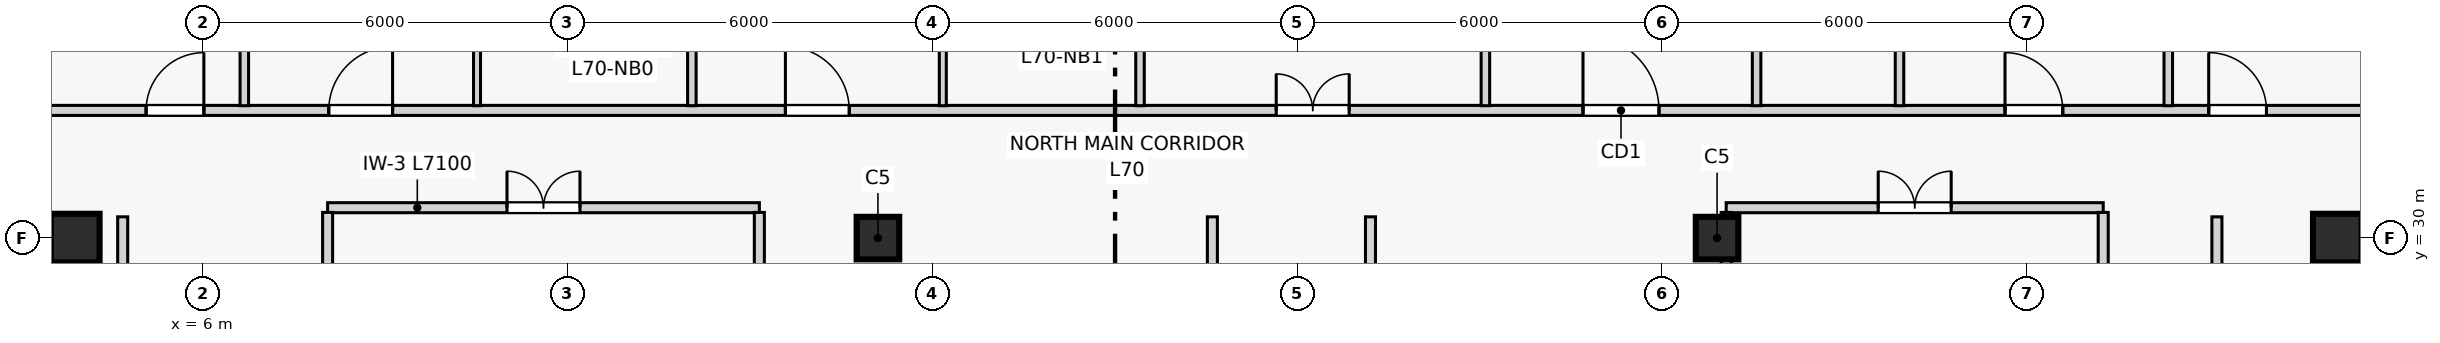
"""IFC4 building model, lengths in metres.
Left out: names, types, materials, properties, quantities, classifications, styles, units other than length and angle.
Written with IfcOpenShell. Run it as: python <this file> out.ifc"""

import sys

from ifc_helpers import new_model, si_unit, direction, frame, frame_2d, origin, origin_2d, place, context, subcontext, project, spatial, rectangle, extrude, source, transform, mapped, element, fill, save


model = new_model("IFC4")
c1 = context("Model", 3, precision=1e-05, world=origin(), true_north=direction((0.0, 1.0)))
c2 = subcontext(c1, "Body", "Model", "MODEL_VIEW")
j1 = project(units=[si_unit("LENGTHUNIT", "METRE"), si_unit("PLANEANGLEUNIT", "RADIAN")], contexts=[c1])
p1 = place(None, origin())
s1 = spatial("IfcSite", under=j1, at=p1, CompositionType="ELEMENT")
p2 = place(p1, origin())
s2 = spatial("IfcBuilding", under=s1, at=p2, CompositionType="ELEMENT")
p3 = place(p2, frame((0.0, 0.0, 267.3)))
s3 = spatial("IfcBuildingStorey", under=s2, at=p3, CompositionType="ELEMENT", Elevation=267.3)
m1 = source(origin(), c2, "Body", "SweptSolid", [
    extrude(rectangle(XDim=0.8, YDim=0.8, at=origin_2d()), origin(), (0.0, 0.0, 1.0), 3.6),
])
for number, where, z_axis, x_axis in (
    (1, (3.9, 30.0, 0.0), (0.0, 0.0, 1.0), (1.0, 0.0, 0.0)),
    (2, (41.1, 30.0, 0.0), (0.0, 0.0, 1.0), (1.0, 0.0, 0.0)),
):
    element("IfcColumn", number, at=place(p3, frame(where, z_axis=z_axis, x_axis=x_axis)), inside=s3, PredefinedType="COLUMN", context=c2, shape_type="MappedRepresentation", body=[
        mapped(m1, transform((0.0, 0.0, 0.0), scale=1.0)),
    ])
m2 = source(origin(), c2, "Body", "SweptSolid", [
    extrude(rectangle(XDim=0.7, YDim=0.7, at=origin_2d()), origin(), (0.0, 0.0, 1.0), 3.6),
])
for number, where, z_axis, x_axis in (
    (3, (17.1, 30.0, 0.0), (0.0, 0.0, 1.0), (1.0, 0.0, 0.0)),
    (4, (30.9, 30.0, 0.0), (0.0, 0.0, 1.0), (1.0, 0.0, 0.0)),
):
    element("IfcColumn", number, at=place(p3, frame(where, z_axis=z_axis, x_axis=x_axis)), inside=s3, PredefinedType="COLUMN", context=c2, shape_type="MappedRepresentation", body=[
        mapped(m2, transform((0.0, 0.0, 0.0), scale=1.0)),
    ])
p4 = place(p3, frame((8.05, 30.5, 0.0), z_axis=(0.0, 0.0, 1.0), x_axis=(1.0, 0.0, 0.0)))
e5 = element("IfcWall", 5, at=p4, inside=s3, PredefinedType="PARTITIONING", context=c2, shape_type="SweptSolid", body=[
    extrude(rectangle(XDim=7.1, YDim=0.165, at=frame_2d((3.55, 0.0))), origin(), (0.0, 0.0, 1.0), 3.32),
])
p5 = place(p4, frame((2.95, 0.0, 0.0)))
e6 = element("IfcOpeningElement", 6, at=p5, cuts=e5, PredefinedType="OPENING", context=c2, shape_type="SweptSolid", body=[
    extrude(rectangle(XDim=1.2, YDim=2.2, at=frame_2d((0.6, 1.1))), frame((0.0, 0.093, 0.0), z_axis=(0.0, -1.0, 0.0), x_axis=(1.0, 0.0, 0.0)), (0.0, 0.0, 1.0), 0.185),
])
for number, where, z_axis, x_axis in (
    (7, (8.05, 27.27, 0.0), (0.0, 0.0, 1.0), (0.0, 1.0, 0.0)),
    (8, (15.15, 27.27, 0.0), (0.0, 0.0, 1.0), (0.0, 1.0, 0.0)),
):
    element("IfcWall", number, at=place(p3, frame(where, z_axis=z_axis, x_axis=x_axis)), inside=s3, PredefinedType="PARTITIONING", context=c2, shape_type="SweptSolid", body=[
        extrude(rectangle(XDim=3.153, YDim=0.165, at=frame_2d((1.576, 0.0))), origin(), (0.0, 0.0, 1.0), 3.32),
    ])
p6 = place(p3, frame((31.05, 30.5, 0.0), z_axis=(0.0, 0.0, 1.0), x_axis=(1.0, 0.0, 0.0)))
e9 = element("IfcWall", 9, at=p6, inside=s3, PredefinedType="PARTITIONING", context=c2, shape_type="SweptSolid", body=[
    extrude(rectangle(XDim=6.2, YDim=0.165, at=frame_2d((3.1, 0.0))), origin(), (0.0, 0.0, 1.0), 3.32),
])
p7 = place(p6, frame((2.5, 0.0, 0.0)))
e10 = element("IfcOpeningElement", 10, at=p7, cuts=e9, PredefinedType="OPENING", context=c2, shape_type="SweptSolid", body=[
    extrude(rectangle(XDim=1.2, YDim=2.2, at=frame_2d((0.6, 1.1))), frame((0.0, 0.093, 0.0), z_axis=(0.0, -1.0, 0.0), x_axis=(1.0, 0.0, 0.0)), (0.0, 0.0, 1.0), 0.185),
])
for number, where, z_axis, x_axis in (
    (11, (31.05, 27.27, 0.0), (0.0, 0.0, 1.0), (0.0, 1.0, 0.0)),
    (12, (37.25, 27.27, 0.0), (0.0, 0.0, 1.0), (0.0, 1.0, 0.0)),
):
    element("IfcWall", number, at=place(p3, frame(where, z_axis=z_axis, x_axis=x_axis)), inside=s3, PredefinedType="PARTITIONING", context=c2, shape_type="SweptSolid", body=[
        extrude(rectangle(XDim=3.153, YDim=0.165, at=frame_2d((1.576, 0.0))), origin(), (0.0, 0.0, 1.0), 3.32),
    ])
p8 = place(p3, frame((3.145, 32.1, 0.0), z_axis=(0.0, 0.0, 1.0), x_axis=(1.0, 0.0, 0.0)))
e13 = element("IfcWall", 13, at=p8, inside=s3, PredefinedType="PARTITIONING", context=c2, shape_type="SweptSolid", body=[
    extrude(rectangle(XDim=38.71, YDim=0.165, at=frame_2d((19.355, 0.0))), origin(), (0.0, 0.0, 1.0), 3.32),
])
p9 = place(p8, frame((4.924, 0.0, 0.0)))
e14 = element("IfcOpeningElement", 14, at=p9, cuts=e13, PredefinedType="OPENING", context=c2, shape_type="SweptSolid", body=[
    extrude(rectangle(XDim=1.05, YDim=2.15, at=frame_2d((0.525, 1.075))), frame((0.0, 0.093, 0.0), z_axis=(0.0, -1.0, 0.0), x_axis=(1.0, 0.0, 0.0)), (0.0, 0.0, 1.0), 0.185),
])
p10 = place(p8, frame((12.434, 0.0, 0.0)))
e15 = element("IfcOpeningElement", 15, at=p10, cuts=e13, PredefinedType="OPENING", context=c2, shape_type="SweptSolid", body=[
    extrude(rectangle(XDim=1.05, YDim=2.15, at=frame_2d((0.525, 1.075))), frame((0.0, 0.093, 0.0), z_axis=(0.0, -1.0, 0.0), x_axis=(1.0, 0.0, 0.0)), (0.0, 0.0, 1.0), 0.185),
])
p11 = place(p8, frame((20.505, 0.0, 0.0)))
e16 = element("IfcOpeningElement", 16, at=p11, cuts=e13, PredefinedType="OPENING", context=c2, shape_type="SweptSolid", body=[
    extrude(rectangle(XDim=1.2, YDim=2.2, at=frame_2d((0.6, 1.1))), frame((0.0, 0.093, 0.0), z_axis=(0.0, -1.0, 0.0), x_axis=(1.0, 0.0, 0.0)), (0.0, 0.0, 1.0), 0.185),
])
p12 = place(p8, frame((25.55, 0.0, 0.0)))
e17 = element("IfcOpeningElement", 17, at=p12, cuts=e13, PredefinedType="OPENING", context=c2, shape_type="SweptSolid", body=[
    extrude(rectangle(XDim=1.25, YDim=2.2, at=frame_2d((0.625, 1.1))), frame((0.0, 0.093, 0.0), z_axis=(0.0, -1.0, 0.0), x_axis=(1.0, 0.0, 0.0)), (0.0, 0.0, 1.0), 0.185),
])
p13 = place(p8, frame((32.49, 0.0, 0.0)))
e18 = element("IfcOpeningElement", 18, at=p13, cuts=e13, PredefinedType="OPENING", context=c2, shape_type="SweptSolid", body=[
    extrude(rectangle(XDim=0.95, YDim=2.1, at=frame_2d((0.475, 1.05))), frame((0.0, 0.093, 0.0), z_axis=(0.0, -1.0, 0.0), x_axis=(1.0, 0.0, 0.0)), (0.0, 0.0, 1.0), 0.185),
])
p14 = place(p8, frame((1.92, 0.0, 0.0)))
e19 = element("IfcOpeningElement", 19, at=p14, cuts=e13, PredefinedType="OPENING", context=c2, shape_type="SweptSolid", body=[
    extrude(rectangle(XDim=0.95, YDim=2.1, at=frame_2d((0.475, 1.05))), frame((0.0, 0.093, 0.0), z_axis=(0.0, -1.0, 0.0), x_axis=(1.0, 0.0, 0.0)), (0.0, 0.0, 1.0), 0.185),
])
p15 = place(p8, frame((35.84, 0.0, 0.0)))
e20 = element("IfcOpeningElement", 20, at=p15, cuts=e13, PredefinedType="OPENING", context=c2, shape_type="SweptSolid", body=[
    extrude(rectangle(XDim=0.95, YDim=2.1, at=frame_2d((0.475, 1.05))), frame((0.0, 0.093, 0.0), z_axis=(0.0, -1.0, 0.0), x_axis=(1.0, 0.0, 0.0)), (0.0, 0.0, 1.0), 0.185),
])
p16 = place(p3, frame((22.6, 11.45, 0.0), z_axis=(0.0, 0.0, 1.0), x_axis=(0.0, 1.0, 0.0)))
e21 = element("IfcWall", 21, at=p16, inside=s3, PredefinedType="PARTITIONING", context=c2, shape_type="SweptSolid", body=[
    extrude(rectangle(XDim=18.9, YDim=0.165, at=frame_2d((9.45, 0.0))), origin(), (0.0, 0.0, 1.0), 3.32),
])
p17 = place(p16, frame((8.825, 0.0, 0.0)))
e22 = element("IfcOpeningElement", 22, at=p17, cuts=e21, PredefinedType="OPENING", context=c2, shape_type="SweptSolid", body=[
    extrude(rectangle(XDim=1.25, YDim=2.2, at=frame_2d((0.625, 1.1))), frame((0.0, 0.093, 0.0), z_axis=(0.0, -1.0, 0.0), x_axis=(1.0, 0.0, 0.0)), (0.0, 0.0, 1.0), 0.185),
])
p18 = place(p3, frame((25.2, 11.45, 0.0), z_axis=(0.0, 0.0, 1.0), x_axis=(0.0, 1.0, 0.0)))
e23 = element("IfcWall", 23, at=p18, inside=s3, PredefinedType="PARTITIONING", context=c2, shape_type="SweptSolid", body=[
    extrude(rectangle(XDim=18.9, YDim=0.165, at=frame_2d((9.45, 0.0))), origin(), (0.0, 0.0, 1.0), 3.32),
])
p19 = place(p18, frame((8.825, 0.0, 0.0)))
e24 = element("IfcOpeningElement", 24, at=p19, cuts=e23, PredefinedType="OPENING", context=c2, shape_type="SweptSolid", body=[
    extrude(rectangle(XDim=1.25, YDim=2.2, at=frame_2d((0.625, 1.1))), frame((0.0, 0.093, 0.0), z_axis=(0.0, -1.0, 0.0), x_axis=(1.0, 0.0, 0.0)), (0.0, 0.0, 1.0), 0.185),
])
p20 = place(p3, frame((4.68, 26.45, 0.0), z_axis=(0.0, 0.0, 1.0), x_axis=(0.0, 1.0, 0.0)))
e25 = element("IfcWall", 25, at=p20, inside=s3, PredefinedType="PARTITIONING", context=c2, shape_type="SweptSolid", body=[
    extrude(rectangle(XDim=3.9, YDim=0.165, at=frame_2d((1.95, 0.0))), origin(), (0.0, 0.0, 1.0), 3.32),
])
p21 = place(p20, frame((1.475, 0.0, 0.0)))
e26 = element("IfcOpeningElement", 26, at=p21, cuts=e25, PredefinedType="OPENING", context=c2, shape_type="SweptSolid", body=[
    extrude(rectangle(XDim=0.95, YDim=2.1, at=frame_2d((0.475, 1.05))), frame((0.0, 0.093, 0.0), z_axis=(0.0, -1.0, 0.0), x_axis=(1.0, 0.0, 0.0)), (0.0, 0.0, 1.0), 0.185),
])
p22 = place(p3, frame((39.12, 11.4, 0.0), z_axis=(0.0, 0.0, 1.0), x_axis=(0.0, 1.0, 0.0)))
e27 = element("IfcWall", 27, at=p22, inside=s3, PredefinedType="PARTITIONING", context=c2, shape_type="SweptSolid", body=[
    extrude(rectangle(XDim=18.95, YDim=0.165, at=frame_2d((9.475, 0.0))), origin(), (0.0, 0.0, 1.0), 3.32),
])
p23 = place(p22, frame((2.075, 0.0, 0.0)))
e28 = element("IfcOpeningElement", 28, at=p23, cuts=e27, PredefinedType="OPENING", context=c2, shape_type="SweptSolid", body=[
    extrude(rectangle(XDim=0.95, YDim=2.1, at=frame_2d((0.475, 1.05))), frame((0.0, 0.093, 0.0), z_axis=(0.0, -1.0, 0.0), x_axis=(1.0, 0.0, 0.0)), (0.0, 0.0, 1.0), 0.185),
])
p24 = place(p3, frame((6.68, 32.177, 0.0), z_axis=(0.0, 0.0, 1.0), x_axis=(0.0, 1.0, 0.0)))
e29 = element("IfcWall", 29, at=p24, inside=s3, PredefinedType="PARTITIONING", context=c2, shape_type="SweptSolid", body=[
    extrude(rectangle(XDim=7.877, YDim=0.14, at=frame_2d((3.939, 0.0))), origin(), (0.0, 0.0, 1.0), 3.32),
])
for number, where, z_axis, x_axis in (
    (30, (14.04, 32.177, 0.0), (0.0, 0.0, 1.0), (0.0, 1.0, 0.0)),
    (31, (21.41, 32.177, 0.0), (0.0, 0.0, 1.0), (0.0, 1.0, 0.0)),
    (32, (27.09, 32.177, 0.0), (0.0, 0.0, 1.0), (0.0, 1.0, 0.0)),
    (33, (33.9, 32.177, 0.0), (0.0, 0.0, 1.0), (0.0, 1.0, 0.0)),
):
    element("IfcWall", number, at=place(p3, frame(where, z_axis=z_axis, x_axis=x_axis)), inside=s3, PredefinedType="PARTITIONING", context=c2, shape_type="SweptSolid", body=[
        extrude(rectangle(XDim=9.677, YDim=0.14, at=frame_2d((4.839, 0.0))), origin(), (0.0, 0.0, 1.0), 3.32),
    ])
p25 = place(p3, frame((38.32, 32.177, 0.0), z_axis=(0.0, 0.0, 1.0), x_axis=(0.0, 1.0, 0.0)))
e34 = element("IfcWall", 34, at=p25, inside=s3, PredefinedType="PARTITIONING", context=c2, shape_type="SweptSolid", body=[
    extrude(rectangle(XDim=7.877, YDim=0.14, at=frame_2d((3.939, 0.0))), origin(), (0.0, 0.0, 1.0), 3.32),
])
p26 = place(p3, frame((10.507, 32.177, 0.0), z_axis=(0.0, 0.0, 1.0), x_axis=(0.0, 1.0, 0.0)))
e35 = element("IfcWall", 35, at=p26, inside=s3, PredefinedType="PARTITIONING", context=c2, shape_type="SweptSolid", body=[
    extrude(rectangle(XDim=9.677, YDim=0.115, at=frame_2d((4.839, 0.0))), origin(), (0.0, 0.0, 1.0), 3.32),
])
p27 = place(p26, frame((6.895, 0.0, 0.0)))
e36 = element("IfcOpeningElement", 36, at=p27, cuts=e35, PredefinedType="OPENING", context=c2, shape_type="SweptSolid", body=[
    extrude(rectangle(XDim=0.95, YDim=2.1, at=frame_2d((0.475, 1.05))), frame((0.0, 0.067, 0.0), z_axis=(0.0, -1.0, 0.0), x_axis=(1.0, 0.0, 0.0)), (0.0, 0.0, 1.0), 0.135),
])
p28 = place(p26, frame((3.631, 0.0, 0.0)))
e37 = element("IfcOpeningElement", 37, at=p28, cuts=e35, PredefinedType="OPENING", context=c2, shape_type="SweptSolid", body=[
    extrude(rectangle(XDim=0.9, YDim=2.1, at=frame_2d((0.45, 1.05))), frame((0.0, 0.067, 0.0), z_axis=(0.0, -1.0, 0.0), x_axis=(1.0, 0.0, 0.0)), (0.0, 0.0, 1.0), 0.135),
])
p29 = place(p26, frame((0.973, 0.0, 0.0)))
e38 = element("IfcOpeningElement", 38, at=p29, cuts=e35, PredefinedType="OPENING", context=c2, shape_type="SweptSolid", body=[
    extrude(rectangle(XDim=0.9, YDim=2.1, at=frame_2d((0.45, 1.05))), frame((0.0, 0.067, 0.0), z_axis=(0.0, -1.0, 0.0), x_axis=(1.0, 0.0, 0.0)), (0.0, 0.0, 1.0), 0.135),
])
p30 = place(p3, frame((18.167, 32.177, 0.0), z_axis=(0.0, 0.0, 1.0), x_axis=(0.0, 1.0, 0.0)))
e39 = element("IfcWall", 39, at=p30, inside=s3, PredefinedType="PARTITIONING", context=c2, shape_type="SweptSolid", body=[
    extrude(rectangle(XDim=9.677, YDim=0.115, at=frame_2d((4.839, 0.0))), origin(), (0.0, 0.0, 1.0), 3.32),
])
p31 = place(p30, frame((6.623, 0.0, 0.0)))
e40 = element("IfcOpeningElement", 40, at=p31, cuts=e39, PredefinedType="OPENING", context=c2, shape_type="SweptSolid", body=[
    extrude(rectangle(XDim=0.9, YDim=2.1, at=frame_2d((0.45, 1.05))), frame((0.0, 0.067, 0.0), z_axis=(0.0, -1.0, 0.0), x_axis=(1.0, 0.0, 0.0)), (0.0, 0.0, 1.0), 0.135),
])
p32 = place(p30, frame((2.062, 0.0, 0.0)))
e41 = element("IfcOpeningElement", 41, at=p32, cuts=e39, PredefinedType="OPENING", context=c2, shape_type="SweptSolid", body=[
    extrude(rectangle(XDim=0.9, YDim=2.1, at=frame_2d((0.45, 1.05))), frame((0.0, 0.067, 0.0), z_axis=(0.0, -1.0, 0.0), x_axis=(1.0, 0.0, 0.0)), (0.0, 0.0, 1.0), 0.135),
])
p33 = place(p3, frame((31.55, 32.177, 0.0), z_axis=(0.0, 0.0, 1.0), x_axis=(0.0, 1.0, 0.0)))
e42 = element("IfcWall", 42, at=p33, inside=s3, PredefinedType="PLUMBINGWALL", context=c2, shape_type="SweptSolid", body=[
    extrude(rectangle(XDim=9.677, YDim=0.14, at=frame_2d((4.839, 0.0))), origin(), (0.0, 0.0, 1.0), 3.32),
])
p34 = place(p33, frame((0.962, 0.0, 0.0)))
e43 = element("IfcOpeningElement", 43, at=p34, cuts=e42, PredefinedType="OPENING", context=c2, shape_type="SweptSolid", body=[
    extrude(rectangle(XDim=0.9, YDim=2.1, at=frame_2d((0.45, 1.05))), frame((0.0, 0.08, 0.0), z_axis=(0.0, -1.0, 0.0), x_axis=(1.0, 0.0, 0.0)), (0.0, 0.0, 1.0), 0.16),
])
p35 = place(p33, frame((5.522, 0.0, 0.0)))
e44 = element("IfcOpeningElement", 44, at=p35, cuts=e42, PredefinedType="OPENING", context=c2, shape_type="SweptSolid", body=[
    extrude(rectangle(XDim=0.9, YDim=2.1, at=frame_2d((0.45, 1.05))), frame((0.0, 0.08, 0.0), z_axis=(0.0, -1.0, 0.0), x_axis=(1.0, 0.0, 0.0)), (0.0, 0.0, 1.0), 0.16),
])
m3 = source(origin(), c2, "Body", "SweptSolid", [
    extrude(rectangle(XDim=1.2, YDim=2.2, at=frame_2d((0.6, 1.1))), frame((0.0, 0.025, 0.0), z_axis=(0.0, -1.0, 0.0), x_axis=(1.0, 0.0, 0.0)), (0.0, 0.0, 1.0), 0.05),
])
p36 = place(p5, origin())
e45 = element("IfcDoor", 45, at=p36, inside=s3, OperationType="DOUBLE_DOOR_SINGLE_SWING", PredefinedType="DOOR", context=c2, shape_type="MappedRepresentation", body=[
    mapped(m3, transform((0.0, 0.0, 0.0), scale=1.0)),
])
fill(e6, e45)
p37 = place(p7, origin())
e46 = element("IfcDoor", 46, at=p37, inside=s3, OperationType="DOUBLE_DOOR_SINGLE_SWING", PredefinedType="DOOR", context=c2, shape_type="MappedRepresentation", body=[
    mapped(m3, transform((0.0, 0.0, 0.0), scale=1.0)),
])
fill(e10, e46)
m4 = source(origin(), c2, "Body", "SweptSolid", [
    extrude(rectangle(XDim=1.05, YDim=2.15, at=frame_2d((0.525, 1.075))), frame((0.0, 0.025, 0.0), z_axis=(0.0, -1.0, 0.0), x_axis=(1.0, 0.0, 0.0)), (0.0, 0.0, 1.0), 0.05),
])
p38 = place(p9, origin())
e47 = element("IfcDoor", 47, at=p38, inside=s3, OperationType="SINGLE_SWING_RIGHT", PredefinedType="DOOR", context=c2, shape_type="MappedRepresentation", body=[
    mapped(m4, transform((0.0, 0.0, 0.0), scale=1.0)),
])
fill(e14, e47)
p39 = place(p10, origin())
e48 = element("IfcDoor", 48, at=p39, inside=s3, OperationType="SINGLE_SWING_LEFT", PredefinedType="DOOR", context=c2, shape_type="MappedRepresentation", body=[
    mapped(m4, transform((0.0, 0.0, 0.0), scale=1.0)),
])
fill(e15, e48)
p40 = place(p11, origin())
e49 = element("IfcDoor", 49, at=p40, inside=s3, OperationType="DOUBLE_DOOR_SINGLE_SWING", PredefinedType="DOOR", context=c2, shape_type="MappedRepresentation", body=[
    mapped(m3, transform((0.0, 0.0, 0.0), scale=1.0)),
])
fill(e16, e49)
m5 = source(origin(), c2, "Body", "SweptSolid", [
    extrude(rectangle(XDim=1.25, YDim=2.2, at=frame_2d((0.625, 1.1))), frame((0.0, 0.025, 0.0), z_axis=(0.0, -1.0, 0.0), x_axis=(1.0, 0.0, 0.0)), (0.0, 0.0, 1.0), 0.05),
])
p41 = place(p12, origin())
e50 = element("IfcDoor", 50, at=p41, inside=s3, OperationType="SINGLE_SWING_LEFT", PredefinedType="DOOR", context=c2, shape_type="MappedRepresentation", body=[
    mapped(m5, transform((0.0, 0.0, 0.0), scale=1.0)),
])
fill(e17, e50)
m6 = source(origin(), c2, "Body", "SweptSolid", [
    extrude(rectangle(XDim=0.95, YDim=2.1, at=frame_2d((0.475, 1.05))), frame((0.0, 0.025, 0.0), z_axis=(0.0, -1.0, 0.0), x_axis=(1.0, 0.0, 0.0)), (0.0, 0.0, 1.0), 0.05),
])
p42 = place(p13, origin())
e51 = element("IfcDoor", 51, at=p42, inside=s3, OperationType="SINGLE_SWING_LEFT", PredefinedType="DOOR", context=c2, shape_type="MappedRepresentation", body=[
    mapped(m6, transform((0.0, 0.0, 0.0), scale=1.0)),
])
fill(e18, e51)
p43 = place(p14, origin())
e52 = element("IfcDoor", 52, at=p43, inside=s3, OperationType="SINGLE_SWING_RIGHT", PredefinedType="DOOR", context=c2, shape_type="MappedRepresentation", body=[
    mapped(m6, transform((0.0, 0.0, 0.0), scale=1.0)),
])
fill(e19, e52)
p44 = place(p15, origin())
e53 = element("IfcDoor", 53, at=p44, inside=s3, OperationType="SINGLE_SWING_LEFT", PredefinedType="DOOR", context=c2, shape_type="MappedRepresentation", body=[
    mapped(m6, transform((0.0, 0.0, 0.0), scale=1.0)),
])
fill(e20, e53)
save(model, sys.argv[1])
